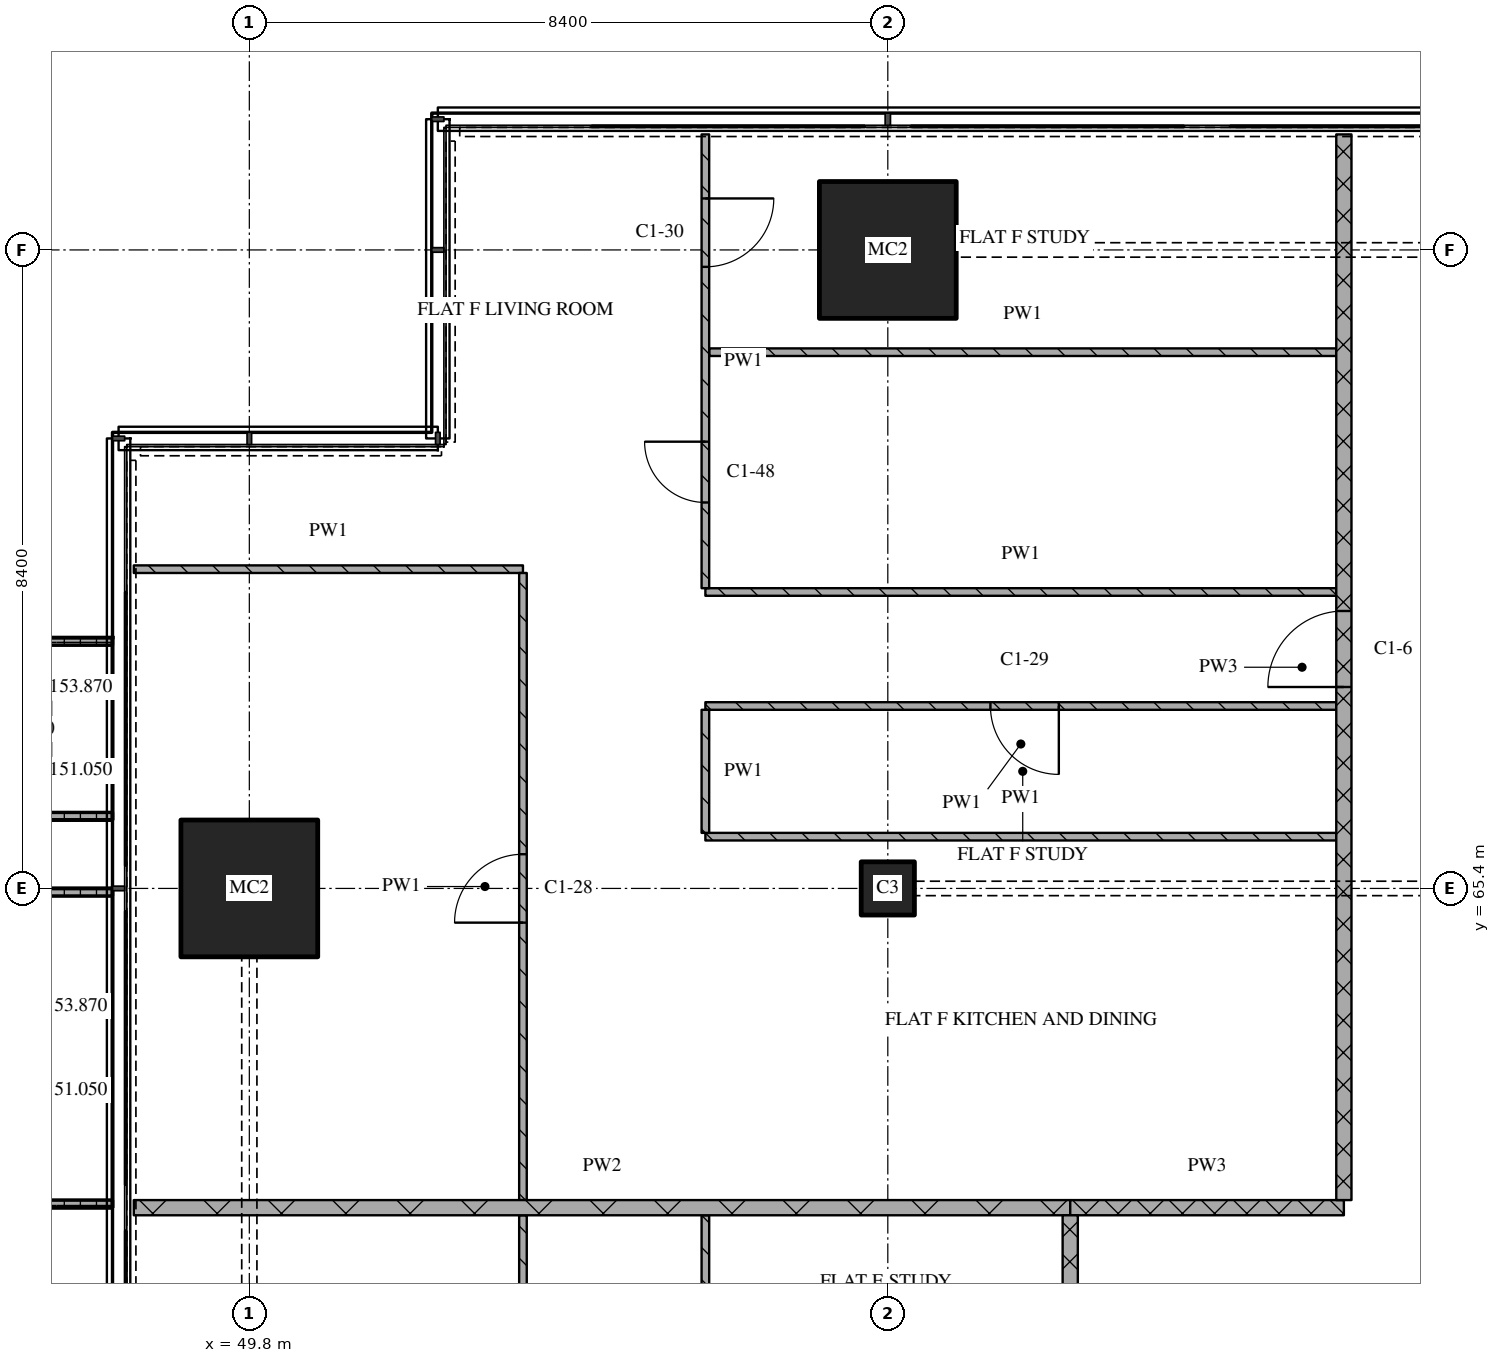
"""IFC4 building model, lengths in metres.
Left out: names, types, materials, properties, quantities, classifications, styles, units other than length and angle.
Written with IfcOpenShell. Run it as: python <this file> out.ifc"""

import sys

from ifc_helpers import new_model, si_unit, direction, frame, frame_2d, origin, origin_2d, place, context, subcontext, project, spatial, polyline, rectangle, outline, extrude, element, fill, save


model = new_model("IFC4")
c1 = context("Model", 3, precision=1e-05, world=origin(), true_north=direction((0.0, 1.0)))
c2 = subcontext(c1, "Body", "Model", "MODEL_VIEW")
j1 = project(units=[si_unit("LENGTHUNIT", "METRE"), si_unit("PLANEANGLEUNIT", "RADIAN")], contexts=[c1])
p1 = place(None, origin())
s1 = spatial("IfcSite", under=j1, at=p1, CompositionType="ELEMENT")
p2 = place(p1, origin())
s2 = spatial("IfcBuilding", under=s1, at=p2, CompositionType="ELEMENT")
p3 = place(p2, frame((0.0, 0.0, 151.05)))
s3 = spatial("IfcBuildingStorey", under=s2, at=p3, CompositionType="ELEMENT", Elevation=151.05)
p4 = place(p3, frame((49.8, 65.4, 0.0), z_axis=(0.0, 0.0, 1.0), x_axis=(1.0, 0.0, 0.0)))
e1 = element("IfcColumn", 1, at=p4, inside=s3, PredefinedType="COLUMN", context=c2, shape_type="SweptSolid", body=[
    extrude(rectangle(XDim=1.8, YDim=1.8, at=origin_2d()), origin(), (0.0, 0.0, 1.0), 3.6),
])
p5 = place(p3, frame((58.2, 65.4, 0.0), z_axis=(0.0, 0.0, 1.0), x_axis=(1.0, 0.0, 0.0)))
e2 = element("IfcColumn", 2, at=p5, inside=s3, PredefinedType="COLUMN", context=c2, shape_type="SweptSolid", body=[
    extrude(rectangle(XDim=0.7, YDim=0.7, at=origin_2d()), origin(), (0.0, 0.0, 1.0), 3.6),
])
p6 = place(p3, frame((58.2, 73.8, 0.0), z_axis=(0.0, 0.0, 1.0), x_axis=(1.0, 0.0, 0.0)))
e3 = element("IfcColumn", 3, at=p6, inside=s3, PredefinedType="COLUMN", context=c2, shape_type="SweptSolid", body=[
    extrude(rectangle(XDim=1.8, YDim=1.8, at=origin_2d()), origin(), (0.0, 0.0, 1.0), 3.6),
])
p7 = place(p3, origin())
e4 = element("IfcWall", 4, at=p7, inside=s3, PredefinedType="SOLIDWALL", context=c2, shape_type="SweptSolid", body=[
    extrude(outline(polyline([(48.0, 68.7), (48.0, 68.6), (46.5, 68.6), (46.5, 66.4), (48.0, 66.4), (48.0, 66.3), (46.4, 66.3), (46.4, 68.7), (48.0, 68.7)])), origin(), (0.0, 0.0, 1.0), 1.0),
])
p8 = place(p3, origin())
e5 = element("IfcWall", 5, at=p8, inside=s3, PredefinedType="SOLIDWALL", context=c2, shape_type="SweptSolid", body=[
    extrude(outline(polyline([(48.0, 65.4), (48.0, 65.3), (46.367, 65.3), (46.367, 61.3), (48.0, 61.3), (48.0, 61.2), (46.267, 61.2), (46.267, 65.4), (48.0, 65.4)])), origin(), (0.0, 0.0, 1.0), 1.0),
])
p9 = place(p3, frame((60.6, 61.2, 0.0), z_axis=(0.0, 0.0, 1.0), x_axis=(1.0, 0.0, 0.0)))
e6 = element("IfcWall", 6, at=p9, inside=s3, PredefinedType="PARTITIONING", context=c2, shape_type="SweptSolid", body=[
    extrude(rectangle(XDim=3.6, YDim=0.2, at=frame_2d((1.8, 0.0))), origin(), (0.0, 0.0, 1.0), 3.32),
])
p10 = place(p3, frame((48.28, 61.2, 0.0), z_axis=(0.0, 0.0, 1.0), x_axis=(1.0, 0.0, 0.0)))
e7 = element("IfcWall", 7, at=p10, inside=s3, PredefinedType="PARTITIONING", context=c2, shape_type="SweptSolid", body=[
    extrude(rectangle(XDim=12.32, YDim=0.2, at=frame_2d((6.16, 0.0))), origin(), (0.0, 0.0, 1.0), 3.32),
])
p11 = place(p3, frame((55.8, 66.081, 0.0), z_axis=(0.0, 0.0, 1.0), x_axis=(1.0, 0.0, 0.0)))
e8 = element("IfcWall", 8, at=p11, inside=s3, PredefinedType="PARTITIONING", context=c2, shape_type="SweptSolid", body=[
    extrude(rectangle(XDim=8.3, YDim=0.1, at=frame_2d((4.15, 0.0))), origin(), (0.0, 0.0, 1.0), 3.32),
])
p12 = place(p3, frame((64.1, 67.8, 0.0), z_axis=(0.0, 0.0, 1.0), x_axis=(-1.0, 0.0, 0.0)))
e9 = element("IfcWall", 9, at=p12, inside=s3, PredefinedType="PARTITIONING", context=c2, shape_type="SweptSolid", body=[
    extrude(rectangle(XDim=8.3, YDim=0.1, at=frame_2d((4.15, 0.0))), origin(), (0.0, 0.0, 1.0), 3.32),
])
p13 = place(p12, frame((3.65, 0.0, 0.0)))
e10 = element("IfcOpeningElement", 10, at=p13, cuts=e9, PredefinedType="OPENING", context=c2, shape_type="SweptSolid", body=[
    extrude(rectangle(XDim=0.9, YDim=2.1, at=frame_2d((0.45, 1.05))), frame((0.0, 0.06, 0.0), z_axis=(0.0, -1.0, 0.0), x_axis=(1.0, 0.0, 0.0)), (0.0, 0.0, 1.0), 0.12),
])
p14 = place(p3, frame((55.8, 69.3, 0.0), z_axis=(0.0, 0.0, 1.0), x_axis=(1.0, 0.0, 0.0)))
e11 = element("IfcWall", 11, at=p14, inside=s3, PredefinedType="PARTITIONING", context=c2, shape_type="SweptSolid", body=[
    extrude(rectangle(XDim=8.3, YDim=0.1, at=frame_2d((4.15, 0.0))), origin(), (0.0, 0.0, 1.0), 3.32),
])
p15 = place(p3, frame((48.28, 69.6, 0.0), z_axis=(0.0, 0.0, 1.0), x_axis=(1.0, 0.0, 0.0)))
e12 = element("IfcWall", 12, at=p15, inside=s3, PredefinedType="PARTITIONING", context=c2, shape_type="SweptSolid", body=[
    extrude(rectangle(XDim=5.12, YDim=0.1, at=frame_2d((2.56, 0.0))), origin(), (0.0, 0.0, 1.0), 3.32),
])
p16 = place(p3, frame((55.85, 72.455, 0.0), z_axis=(0.0, 0.0, 1.0), x_axis=(1.0, 0.0, 0.0)))
e13 = element("IfcWall", 13, at=p16, inside=s3, PredefinedType="PARTITIONING", context=c2, shape_type="SweptSolid", body=[
    extrude(rectangle(XDim=8.25, YDim=0.1, at=frame_2d((4.125, 0.0))), origin(), (0.0, 0.0, 1.0), 3.32),
])
p17 = place(p3, frame((55.8, 61.1, 0.0), z_axis=(0.0, 0.0, 1.0), x_axis=(0.0, -1.0, 0.0)))
e14 = element("IfcWall", 14, at=p17, inside=s3, PredefinedType="PARTITIONING", context=c2, shape_type="SweptSolid", body=[
    extrude(rectangle(XDim=2.85, YDim=0.1, at=frame_2d((1.425, 0.0))), origin(), (0.0, 0.0, 1.0), 3.32),
])
p18 = place(p17, frame((0.95, 0.0, 0.0)))
e15 = element("IfcOpeningElement", 15, at=p18, cuts=e14, PredefinedType="OPENING", context=c2, shape_type="SweptSolid", body=[
    extrude(rectangle(XDim=0.9, YDim=2.1, at=frame_2d((0.45, 1.05))), frame((0.0, 0.06, 0.0), z_axis=(0.0, -1.0, 0.0), x_axis=(1.0, 0.0, 0.0)), (0.0, 0.0, 1.0), 0.12),
])
p19 = place(p3, frame((55.8, 67.75, 0.0), z_axis=(0.0, 0.0, 1.0), x_axis=(0.0, -1.0, 0.0)))
e16 = element("IfcWall", 16, at=p19, inside=s3, PredefinedType="PARTITIONING", context=c2, shape_type="SweptSolid", body=[
    extrude(rectangle(XDim=1.619, YDim=0.1, at=frame_2d((0.81, 0.0))), origin(), (0.0, 0.0, 1.0), 3.32),
])
p20 = place(p3, frame((55.8, 75.32, 0.0), z_axis=(0.0, 0.0, 1.0), x_axis=(0.0, -1.0, 0.0)))
e17 = element("IfcWall", 17, at=p20, inside=s3, PredefinedType="PARTITIONING", context=c2, shape_type="SweptSolid", body=[
    extrude(rectangle(XDim=5.97, YDim=0.1, at=frame_2d((2.985, 0.0))), origin(), (0.0, 0.0, 1.0), 3.32),
])
p21 = place(p20, frame((0.843, 0.0, 0.0)))
e18 = element("IfcOpeningElement", 18, at=p21, cuts=e17, PredefinedType="OPENING", context=c2, shape_type="SweptSolid", body=[
    extrude(rectangle(XDim=0.9, YDim=2.1, at=frame_2d((0.45, 1.05))), frame((0.0, 0.06, 0.0), z_axis=(0.0, -1.0, 0.0), x_axis=(1.0, 0.0, 0.0)), (0.0, 0.0, 1.0), 0.12),
])
p22 = place(p20, frame((4.042, 0.0, 0.0)))
e19 = element("IfcOpeningElement", 19, at=p22, cuts=e17, PredefinedType="OPENING", context=c2, shape_type="SweptSolid", body=[
    extrude(rectangle(XDim=0.8, YDim=2.1, at=frame_2d((0.4, 1.05))), frame((0.0, 0.06, 0.0), z_axis=(0.0, -1.0, 0.0), x_axis=(1.0, 0.0, 0.0)), (0.0, 0.0, 1.0), 0.12),
])
p23 = place(p3, frame((60.6, 43.3, 0.0), z_axis=(0.0, 0.0, 1.0), x_axis=(0.0, 1.0, 0.0)))
e20 = element("IfcWall", 20, at=p23, inside=s3, PredefinedType="PARTITIONING", context=c2, shape_type="SweptSolid", body=[
    extrude(rectangle(XDim=17.8, YDim=0.2, at=frame_2d((8.9, 0.0))), origin(), (0.0, 0.0, 1.0), 3.32),
])
p24 = place(p23, frame((6.15, 0.0, 0.0)))
e21 = element("IfcOpeningElement", 21, at=p24, cuts=e20, PredefinedType="OPENING", context=c2, shape_type="SweptSolid", body=[
    extrude(rectangle(XDim=1.0, YDim=2.1, at=frame_2d((0.5, 1.05))), frame((0.0, 0.11, 0.0), z_axis=(0.0, -1.0, 0.0), x_axis=(1.0, 0.0, 0.0)), (0.0, 0.0, 1.0), 0.22),
])
p25 = place(p3, frame((64.2, 61.3, 0.0), z_axis=(0.0, 0.0, 1.0), x_axis=(0.0, 1.0, 0.0)))
e22 = element("IfcWall", 22, at=p25, inside=s3, PredefinedType="PARTITIONING", context=c2, shape_type="SweptSolid", body=[
    extrude(rectangle(XDim=14.02, YDim=0.2, at=frame_2d((7.01, 0.0))), origin(), (0.0, 0.0, 1.0), 3.32),
])
p26 = place(p25, frame((6.75, 0.0, 0.0)))
e23 = element("IfcOpeningElement", 23, at=p26, cuts=e22, PredefinedType="OPENING", context=c2, shape_type="SweptSolid", body=[
    extrude(rectangle(XDim=1.0, YDim=2.1, at=frame_2d((0.5, 1.05))), frame((0.0, 0.11, 0.0), z_axis=(0.0, -1.0, 0.0), x_axis=(1.0, 0.0, 0.0)), (0.0, 0.0, 1.0), 0.22),
])
p27 = place(p3, frame((53.4, 61.1, 0.0), z_axis=(0.0, 0.0, 1.0), x_axis=(0.0, -1.0, 0.0)))
e24 = element("IfcWall", 24, at=p27, inside=s3, PredefinedType="PARTITIONING", context=c2, shape_type="SweptSolid", body=[
    extrude(rectangle(XDim=8.25, YDim=0.1, at=frame_2d((4.125, 0.0))), origin(), (0.0, 0.0, 1.0), 3.32),
])
p28 = place(p3, frame((53.4, 61.3, 0.0), z_axis=(0.0, 0.0, 1.0), x_axis=(0.0, 1.0, 0.0)))
e25 = element("IfcWall", 25, at=p28, inside=s3, PredefinedType="PARTITIONING", context=c2, shape_type="SweptSolid", body=[
    extrude(rectangle(XDim=8.25, YDim=0.1, at=frame_2d((4.125, 0.0))), origin(), (0.0, 0.0, 1.0), 3.32),
])
p29 = place(p28, frame((3.65, 0.0, 0.0)))
e26 = element("IfcOpeningElement", 26, at=p29, cuts=e25, PredefinedType="OPENING", context=c2, shape_type="SweptSolid", body=[
    extrude(rectangle(XDim=0.9, YDim=2.1, at=frame_2d((0.45, 1.05))), frame((0.0, 0.06, 0.0), z_axis=(0.0, -1.0, 0.0), x_axis=(1.0, 0.0, 0.0)), (0.0, 0.0, 1.0), 0.12),
])
p30 = place(p13, origin())
e27 = element("IfcDoor", 27, at=p30, inside=s3, OperationType="SINGLE_SWING_LEFT", PredefinedType="DOOR", context=c2, shape_type="SweptSolid", body=[
    extrude(rectangle(XDim=0.9, YDim=2.1, at=frame_2d((0.45, 1.05))), frame((0.0, 0.025, 0.0), z_axis=(0.0, -1.0, 0.0), x_axis=(1.0, 0.0, 0.0)), (0.0, 0.0, 1.0), 0.05),
])
fill(e10, e27)
p31 = place(p21, origin())
e28 = element("IfcDoor", 28, at=p31, inside=s3, OperationType="SINGLE_SWING_LEFT", PredefinedType="DOOR", context=c2, shape_type="SweptSolid", body=[
    extrude(rectangle(XDim=0.9, YDim=2.1, at=frame_2d((0.45, 1.05))), frame((0.0, 0.025, 0.0), z_axis=(0.0, -1.0, 0.0), x_axis=(1.0, 0.0, 0.0)), (0.0, 0.0, 1.0), 0.05),
])
fill(e18, e28)
p32 = place(p22, origin())
e29 = element("IfcDoor", 29, at=p32, inside=s3, OperationType="SINGLE_SWING_RIGHT", PredefinedType="DOOR", context=c2, shape_type="SweptSolid", body=[
    extrude(rectangle(XDim=0.8, YDim=2.1, at=frame_2d((0.4, 1.05))), frame((0.0, 0.025, 0.0), z_axis=(0.0, -1.0, 0.0), x_axis=(1.0, 0.0, 0.0)), (0.0, 0.0, 1.0), 0.05),
])
fill(e19, e29)
p33 = place(p26, origin())
e30 = element("IfcDoor", 30, at=p33, inside=s3, OperationType="SINGLE_SWING_LEFT", PredefinedType="DOOR", context=c2, shape_type="SweptSolid", body=[
    extrude(rectangle(XDim=1.0, YDim=2.1, at=frame_2d((0.5, 1.05))), frame((0.0, 0.025, 0.0), z_axis=(0.0, -1.0, 0.0), x_axis=(1.0, 0.0, 0.0)), (0.0, 0.0, 1.0), 0.05),
])
fill(e23, e30)
p34 = place(p29, origin())
e31 = element("IfcDoor", 31, at=p34, inside=s3, OperationType="SINGLE_SWING_LEFT", PredefinedType="DOOR", context=c2, shape_type="SweptSolid", body=[
    extrude(rectangle(XDim=0.9, YDim=2.1, at=frame_2d((0.45, 1.05))), frame((0.0, 0.025, 0.0), z_axis=(0.0, -1.0, 0.0), x_axis=(1.0, 0.0, 0.0)), (0.0, 0.0, 1.0), 0.05),
])
fill(e26, e31)
save(model, sys.argv[1])
